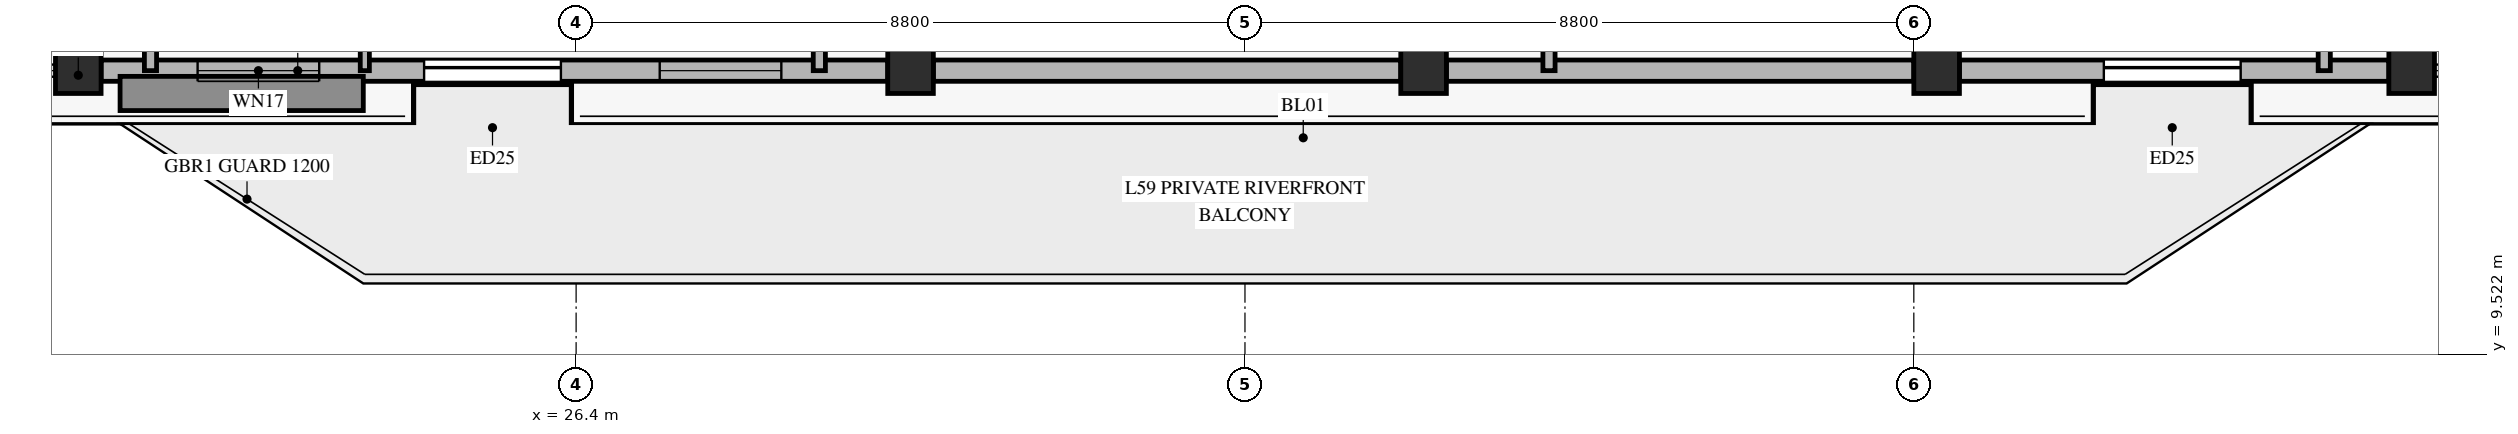
"""IFC4 building model, lengths in metres.
Left out: names, types, materials, properties, quantities, classifications, styles, units other than length and angle.
Written with IfcOpenShell. Run it as: python <this file> out.ifc"""

import sys

from ifc_helpers import new_model, si_unit, direction, frame, frame_2d, origin, origin_2d, place, context, subcontext, project, spatial, rectangle, hollow_rectangle, extrude, source, transform, mapped, element, fill, save


model = new_model("IFC4")
c1 = context("Model", 3, precision=1e-05, world=origin(), true_north=direction((0.0, 1.0)))
c2 = subcontext(c1, "Body", "Model", "MODEL_VIEW")
j1 = project(units=[si_unit("LENGTHUNIT", "METRE"), si_unit("PLANEANGLEUNIT", "RADIAN")], contexts=[c1])
p1 = place(None, origin())
s1 = spatial("IfcSite", under=j1, at=p1, CompositionType="ELEMENT")
p2 = place(p1, origin())
s2 = spatial("IfcBuilding", under=s1, at=p2, CompositionType="ELEMENT")
p3 = place(p2, frame((0.0, 0.0, 233.8)))
s3 = spatial("IfcBuildingStorey", under=s2, at=p3, CompositionType="ELEMENT", Elevation=233.8)
m1 = source(origin(), c2, "Body", "SweptSolid", [
    extrude(hollow_rectangle(XDim=0.6, YDim=0.6, WallThickness=0.028, at=origin_2d()), origin(), (0.0, 0.0, 1.0), 3.256),
])
for number, where, z_axis, x_axis in (
    (1, (19.85, 13.25, 0.0), (0.0, 0.286, 0.958), (-1.0, 0.0, 0.0)),
    (2, (30.8, 13.25, 0.0), (0.0, 0.286, 0.958), (-1.0, 0.0, 0.0)),
    (3, (37.55, 13.25, 0.0), (0.0, 0.286, 0.958), (-1.0, 0.0, 0.0)),
    (4, (44.3, 13.25, 0.0), (0.0, 0.286, 0.958), (-1.0, 0.0, 0.0)),
    (5, (50.55, 13.25, 0.0), (0.0, 0.286, 0.958), (-1.0, 0.0, 0.0)),
):
    element("IfcColumn", number, at=place(p3, frame(where, z_axis=z_axis, x_axis=x_axis)), inside=s3, PredefinedType="COLUMN", context=c2, shape_type="MappedRepresentation", body=[
        mapped(m1, transform((0.0, 0.0, 0.0), x_axis=(1.0, 0.0, 0.0), y_axis=(0.0, 1.0, 0.0), z_axis=(0.0, 0.0, 1.0), scale=1.0)),
    ])
p4 = place(p3, frame((20.15, 13.25, 0.0), z_axis=(0.0, 0.0, 1.0), x_axis=(1.0, 0.0, 0.0)))
e6 = element("IfcWall", 6, at=p4, inside=s3, PredefinedType="SOLIDWALL", context=c2, shape_type="SweptSolid", body=[
    extrude(rectangle(XDim=10.35, YDim=0.28, at=frame_2d((5.175, 0.0))), origin(), (0.0, 0.0, 1.0), 2.75),
])
p5 = place(p4, frame((4.25, 0.0, 0.0)))
e7 = element("IfcOpeningElement", 7, at=p5, cuts=e6, PredefinedType="OPENING", context=c2, shape_type="SweptSolid", body=[
    extrude(rectangle(XDim=1.8, YDim=2.25, at=frame_2d((0.9, 1.125))), frame((0.0, 0.15, 0.0), z_axis=(0.0, -1.0, 0.0), x_axis=(1.0, 0.0, 0.0)), (0.0, 0.0, 1.0), 0.3),
])
p6 = place(p4, frame((1.27, 0.0, 0.45)))
e8 = element("IfcOpeningElement", 8, at=p6, cuts=e6, PredefinedType="OPENING", context=c2, shape_type="SweptSolid", body=[
    extrude(rectangle(XDim=1.6, YDim=2.0, at=frame_2d((0.8, 1.0))), frame((0.0, 0.15, 0.0), z_axis=(0.0, -1.0, 0.0), x_axis=(1.0, 0.0, 0.0)), (0.0, 0.0, 1.0), 0.3),
])
p7 = place(p4, frame((7.35, 0.0, 0.45)))
e9 = element("IfcOpeningElement", 9, at=p7, cuts=e6, PredefinedType="OPENING", context=c2, shape_type="SweptSolid", body=[
    extrude(rectangle(XDim=1.6, YDim=2.0, at=frame_2d((0.8, 1.0))), frame((0.0, 0.15, 0.0), z_axis=(0.0, -1.0, 0.0), x_axis=(1.0, 0.0, 0.0)), (0.0, 0.0, 1.0), 0.3),
])
for number, where, z_axis, x_axis in (
    (10, (31.1, 13.25, 0.0), (0.0, 0.0, 1.0), (1.0, 0.0, 0.0)),
    (11, (37.85, 13.25, 0.0), (0.0, 0.0, 1.0), (1.0, 0.0, 0.0)),
):
    element("IfcWall", number, at=place(p3, frame(where, z_axis=z_axis, x_axis=x_axis)), inside=s3, PredefinedType="SOLIDWALL", context=c2, shape_type="SweptSolid", body=[
        extrude(rectangle(XDim=6.15, YDim=0.28, at=frame_2d((3.075, 0.0))), origin(), (0.0, 0.0, 1.0), 2.75),
    ])
p8 = place(p3, frame((44.6, 13.25, 0.0), z_axis=(0.0, 0.0, 1.0), x_axis=(1.0, 0.0, 0.0)))
e12 = element("IfcWall", 12, at=p8, inside=s3, PredefinedType="SOLIDWALL", context=c2, shape_type="SweptSolid", body=[
    extrude(rectangle(XDim=5.65, YDim=0.28, at=frame_2d((2.825, 0.0))), origin(), (0.0, 0.0, 1.0), 2.75),
])
p9 = place(p8, frame((1.9, 0.0, 0.0)))
e13 = element("IfcOpeningElement", 13, at=p9, cuts=e12, PredefinedType="OPENING", context=c2, shape_type="SweptSolid", body=[
    extrude(rectangle(XDim=1.8, YDim=2.25, at=frame_2d((0.9, 1.125))), frame((0.0, 0.15, 0.0), z_axis=(0.0, -1.0, 0.0), x_axis=(1.0, 0.0, 0.0)), (0.0, 0.0, 1.0), 0.3),
])
for number, where, z_axis, x_axis in (
    (14, (20.8, 13.25, 0.0), (0.0, 0.0, 1.0), (0.0, 1.0, 0.0)),
    (15, (29.6, 13.25, 0.0), (0.0, 0.0, 1.0), (0.0, 1.0, 0.0)),
    (16, (39.2, 13.25, 0.0), (0.0, 0.0, 1.0), (0.0, 1.0, 0.0)),
    (17, (49.4, 13.25, 0.0), (0.0, 0.0, 1.0), (0.0, 1.0, 0.0)),
):
    element("IfcWall", number, at=place(p3, frame(where, z_axis=z_axis, x_axis=x_axis)), inside=s3, PredefinedType="PARTITIONING", context=c2, shape_type="SweptSolid", body=[
        extrude(rectangle(XDim=21.85, YDim=0.16, at=frame_2d((10.925, 0.0))), origin(), (0.0, 0.0, 1.0), 2.705),
    ])
p10 = place(p3, frame((23.62, 13.25, 0.0), z_axis=(0.0, 0.0, 1.0), x_axis=(0.0, 1.0, 0.0)))
e18 = element("IfcWall", 18, at=p10, inside=s3, PredefinedType="PARTITIONING", context=c2, shape_type="SweptSolid", body=[
    extrude(rectangle(XDim=19.2, YDim=0.12, at=frame_2d((9.6, 0.0))), origin(), (0.0, 0.0, 1.0), 2.705),
])
p11 = place(p10, frame((1.602, 0.0, 0.0)))
e19 = element("IfcOpeningElement", 19, at=p11, cuts=e18, PredefinedType="OPENING", context=c2, shape_type="SweptSolid", body=[
    extrude(rectangle(XDim=0.95, YDim=2.1, at=frame_2d((0.475, 1.05))), frame((0.0, 0.07, 0.0), z_axis=(0.0, -1.0, 0.0), x_axis=(1.0, 0.0, 0.0)), (0.0, 0.0, 1.0), 0.14),
])
p12 = place(p10, frame((8.276, 0.0, 0.0)))
e20 = element("IfcOpeningElement", 20, at=p12, cuts=e18, PredefinedType="OPENING", context=c2, shape_type="SweptSolid", body=[
    extrude(rectangle(XDim=0.95, YDim=2.1, at=frame_2d((0.475, 1.05))), frame((0.0, 0.07, 0.0), z_axis=(0.0, -1.0, 0.0), x_axis=(1.0, 0.0, 0.0)), (0.0, 0.0, 1.0), 0.14),
])
p13 = place(p10, frame((14.058, 0.0, 0.0)))
e21 = element("IfcOpeningElement", 21, at=p13, cuts=e18, PredefinedType="OPENING", context=c2, shape_type="SweptSolid", body=[
    extrude(rectangle(XDim=0.95, YDim=2.1, at=frame_2d((0.475, 1.05))), frame((0.0, 0.07, 0.0), z_axis=(0.0, -1.0, 0.0), x_axis=(1.0, 0.0, 0.0)), (0.0, 0.0, 1.0), 0.14),
])
m2 = source(origin(), c2, "Body", "SweptSolid", [
    extrude(rectangle(XDim=1.8, YDim=2.25, at=frame_2d((0.9, 1.125))), frame((0.0, 0.025, 0.0), z_axis=(0.0, -1.0, 0.0), x_axis=(1.0, 0.0, 0.0)), (0.0, 0.0, 1.0), 0.05),
])
p14 = place(p5, origin())
e22 = element("IfcDoor", 22, at=p14, inside=s3, OperationType="SLIDING_TO_LEFT", PredefinedType="DOOR", context=c2, shape_type="MappedRepresentation", body=[
    mapped(m2, transform((0.0, 0.0, 0.0), x_axis=(1.0, 0.0, 0.0), y_axis=(0.0, 1.0, 0.0), z_axis=(0.0, 0.0, 1.0), scale=1.0)),
])
fill(e7, e22)
m3 = source(origin(), c2, "Body", "SweptSolid", [
    extrude(rectangle(XDim=1.6, YDim=2.0, at=frame_2d((0.8, 1.0))), frame((0.0, 0.03, 0.0), z_axis=(0.0, -1.0, 0.0), x_axis=(1.0, 0.0, 0.0)), (0.0, 0.0, 1.0), 0.06),
])
p15 = place(p6, origin())
e23 = element("IfcWindow", 23, at=p15, inside=s3, PartitioningType="SINGLE_PANEL", PredefinedType="WINDOW", context=c2, shape_type="MappedRepresentation", body=[
    mapped(m3, transform((0.0, 0.0, 0.0), x_axis=(1.0, 0.0, 0.0), y_axis=(0.0, 1.0, 0.0), z_axis=(0.0, 0.0, 1.0), scale=1.0)),
])
fill(e8, e23)
p16 = place(p7, origin())
e24 = element("IfcWindow", 24, at=p16, inside=s3, PartitioningType="SINGLE_PANEL", PredefinedType="WINDOW", context=c2, shape_type="MappedRepresentation", body=[
    mapped(m3, transform((0.0, 0.0, 0.0), x_axis=(1.0, 0.0, 0.0), y_axis=(0.0, 1.0, 0.0), z_axis=(0.0, 0.0, 1.0), scale=1.0)),
])
fill(e9, e24)
p17 = place(p9, origin())
e25 = element("IfcDoor", 25, at=p17, inside=s3, OperationType="SLIDING_TO_LEFT", PredefinedType="DOOR", context=c2, shape_type="MappedRepresentation", body=[
    mapped(m2, transform((0.0, 0.0, 0.0), x_axis=(1.0, 0.0, 0.0), y_axis=(0.0, 1.0, 0.0), z_axis=(0.0, 0.0, 1.0), scale=1.0)),
])
fill(e13, e25)
save(model, sys.argv[1])
